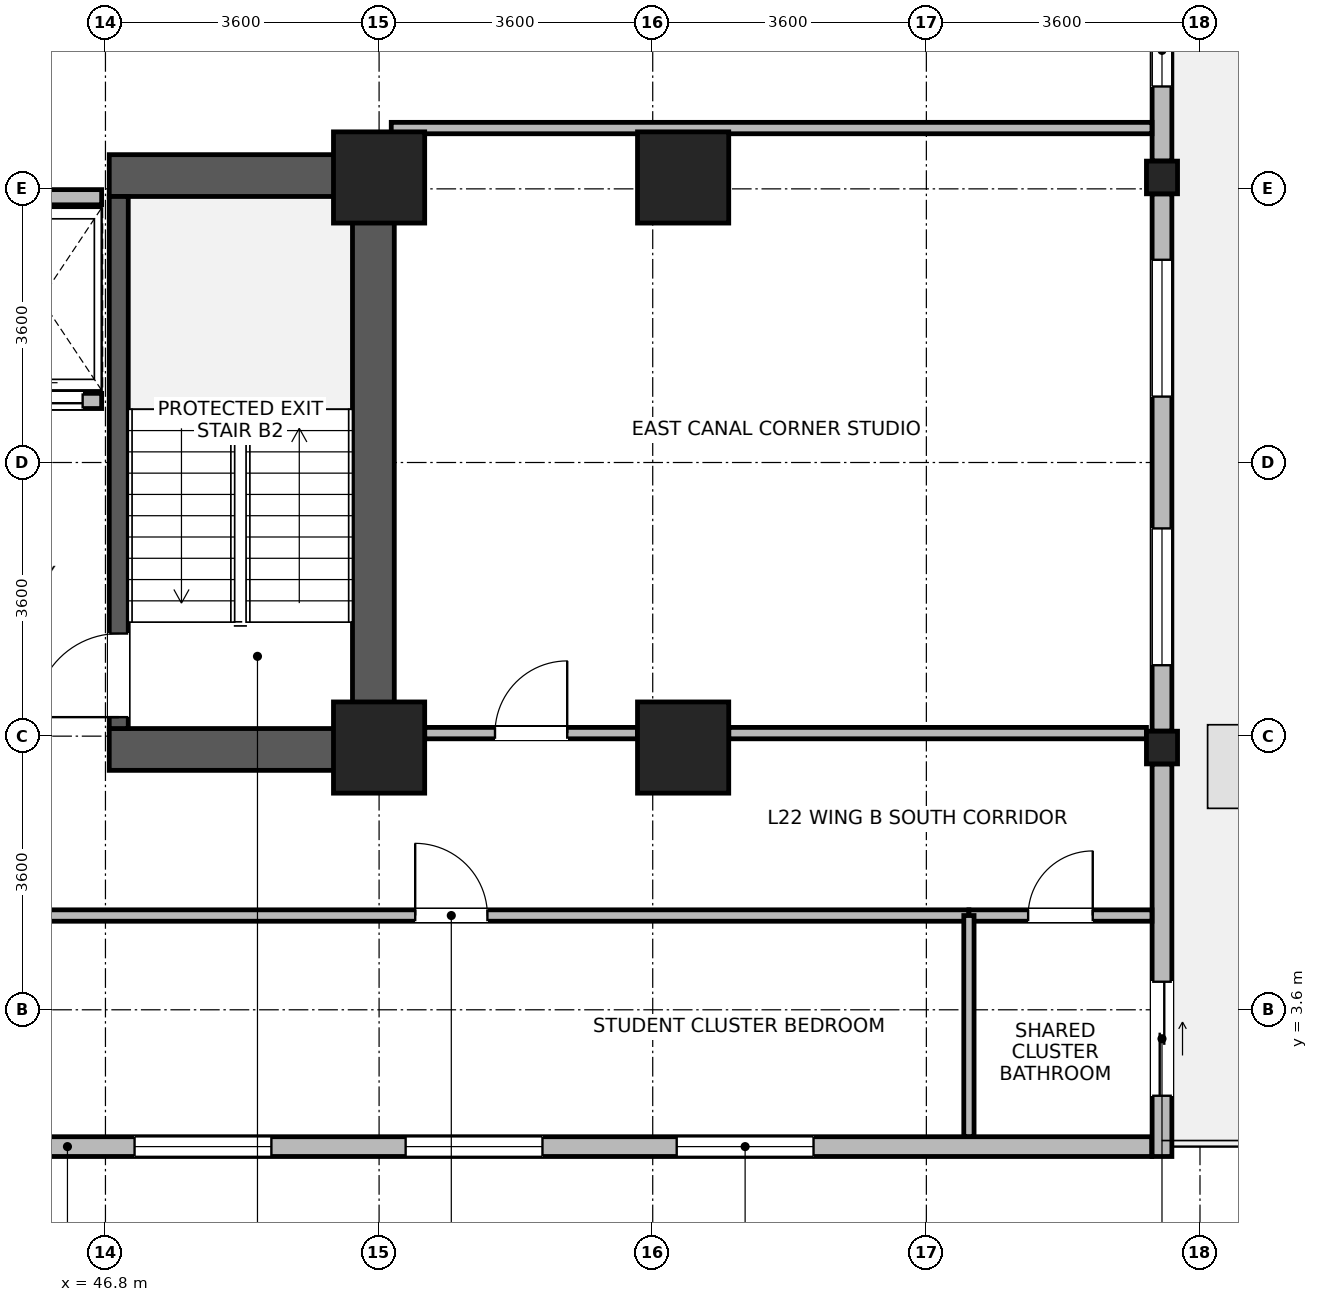
"""IFC4 building model, lengths in metres.
Left out: names, types, materials, properties, quantities, classifications, styles, units other than length and angle.
Written with IfcOpenShell. Run it as: python <this file> out.ifc"""

import sys

from ifc_helpers import new_model, si_unit, direction, frame, frame_2d, origin, origin_2d, place, context, subcontext, project, spatial, rectangle, i_section, extrude, source, transform, mapped, element, fill, save


model = new_model("IFC4")
c1 = context("Model", 3, precision=1e-05, world=origin(), true_north=direction((0.0, 1.0)))
c2 = subcontext(c1, "Body", "Model", "MODEL_VIEW")
j1 = project(units=[si_unit("LENGTHUNIT", "METRE"), si_unit("PLANEANGLEUNIT", "RADIAN")], contexts=[c1])
p1 = place(None, origin())
s1 = spatial("IfcSite", under=j1, at=p1, CompositionType="ELEMENT")
p2 = place(p1, origin())
s2 = spatial("IfcBuilding", under=s1, at=p2, CompositionType="ELEMENT")
p3 = place(p2, frame((0.0, 0.0, 89.7)))
s3 = spatial("IfcBuildingStorey", under=s2, at=p3, CompositionType="ELEMENT", Elevation=89.7)
p4 = place(p3, frame((50.325, 6.75, 0.0), z_axis=(0.0, 0.0, 1.0), x_axis=(0.0, 1.0, 0.0)))
e1 = element("IfcWall", 1, at=p4, inside=s3, PredefinedType="SHEAR", context=c2, shape_type="SweptSolid", body=[
    extrude(rectangle(XDim=8.1, YDim=0.55, at=frame_2d((4.05, 0.0))), origin(), (0.0, 0.0, 1.0), 3.45),
])
for number, where, z_axis, x_axis in (
    (2, (46.85, 7.025, 0.0), (0.0, 0.0, 1.0), (1.0, 0.0, 0.0)),
    (3, (46.85, 14.575, 0.0), (0.0, 0.0, 1.0), (1.0, 0.0, 0.0)),
):
    element("IfcWall", number, at=place(p3, frame(where, z_axis=z_axis, x_axis=x_axis)), inside=s3, PredefinedType="SHEAR", context=c2, shape_type="SweptSolid", body=[
        extrude(rectangle(XDim=3.2, YDim=0.55, at=frame_2d((1.6, 0.0))), origin(), (0.0, 0.0, 1.0), 3.45),
    ])
p5 = place(p3, frame((46.975, 7.3, 0.0), z_axis=(0.0, 0.0, 1.0), x_axis=(0.0, 1.0, 0.0)))
e4 = element("IfcWall", 4, at=p5, inside=s3, PredefinedType="SHEAR", context=c2, shape_type="SweptSolid", body=[
    extrude(rectangle(XDim=7.0, YDim=0.25, at=frame_2d((3.5, 0.0))), origin(), (0.0, 0.0, 1.0), 3.45),
])
p6 = place(p5, frame((0.15, 0.0, 0.0)))
e5 = element("IfcOpeningElement", 5, at=p6, cuts=e4, PredefinedType="OPENING", context=c2, shape_type="SweptSolid", body=[
    extrude(rectangle(XDim=1.1, YDim=2.08, at=frame_2d((0.55, 1.04))), frame((0.0, 0.135, 0.0), z_axis=(0.0, -1.0, 0.0), x_axis=(1.0, 0.0, 0.0)), (0.0, 0.0, 1.0), 0.27),
])
m1 = source(origin(), c2, "Body", "SweptSolid", [
    extrude(rectangle(XDim=1.2, YDim=1.2, at=origin_2d()), origin(), (0.0, 0.0, 1.0), 3.7),
])
for number, where, z_axis, x_axis in (
    (6, (50.4, 7.05, 0.0), (0.0, 0.0, 1.0), (1.0, 0.0, 0.0)),
    (7, (50.4, 14.55, 0.0), (0.0, 0.0, 1.0), (1.0, 0.0, 0.0)),
    (8, (54.4, 7.05, 0.0), (0.0, 0.0, 1.0), (1.0, 0.0, 0.0)),
    (9, (54.4, 14.55, 0.0), (0.0, 0.0, 1.0), (1.0, 0.0, 0.0)),
):
    element("IfcColumn", number, at=place(p3, frame(where, z_axis=z_axis, x_axis=x_axis)), inside=s3, PredefinedType="COLUMN", context=c2, shape_type="MappedRepresentation", body=[
        mapped(m1, transform((0.0, 0.0, 0.0), x_axis=(1.0, 0.0, 0.0), y_axis=(0.0, 1.0, 0.0), z_axis=(0.0, 0.0, 1.0), scale=1.0)),
    ])
m2 = source(origin(), c2, "Body", "SweptSolid", [
    extrude(i_section(OverallWidth=0.409, OverallDepth=0.43, WebThickness=0.024, FlangeThickness=0.033, FilletRadius=0.015, at=origin_2d()), origin(), (0.0, 0.0, 1.0), 3.7),
])
for number, where, z_axis, x_axis in (
    (10, (60.7, 7.05, 0.0), (0.0, 0.0, 1.0), (1.0, 0.0, 0.0)),
    (11, (60.7, 14.55, 0.0), (0.0, 0.0, 1.0), (1.0, 0.0, 0.0)),
):
    element("IfcColumn", number, at=place(p3, frame(where, z_axis=z_axis, x_axis=x_axis)), inside=s3, PredefinedType="COLUMN", context=c2, shape_type="MappedRepresentation", body=[
        mapped(m2, transform((0.0, 0.0, 0.0), x_axis=(1.0, 0.0, 0.0), y_axis=(0.0, 1.0, 0.0), z_axis=(0.0, 0.0, 1.0), scale=1.0)),
    ])
p7 = place(p3, frame((60.565, 1.8, 0.0), z_axis=(0.0, 0.0, 1.0), x_axis=(-1.0, 0.0, 0.0)))
e12 = element("IfcWall", 12, at=p7, inside=s3, PredefinedType="STANDARD", context=c2, shape_type="SweptSolid", body=[
    extrude(rectangle(XDim=28.53, YDim=0.26, at=frame_2d((14.265, 0.0))), origin(), (0.0, 0.0, 1.0), 3.43),
])
p8 = place(p7, frame((4.449, 0.0, 0.85)))
e13 = element("IfcOpeningElement", 13, at=p8, cuts=e12, PredefinedType="OPENING", context=c2, shape_type="SweptSolid", body=[
    extrude(rectangle(XDim=1.8, YDim=1.85, at=frame_2d((0.9, 0.925))), frame((0.0, 0.14, 0.0), z_axis=(0.0, -1.0, 0.0), x_axis=(1.0, 0.0, 0.0)), (0.0, 0.0, 1.0), 0.28),
])
p9 = place(p7, frame((8.016, 0.0, 0.85)))
e14 = element("IfcOpeningElement", 14, at=p9, cuts=e12, PredefinedType="OPENING", context=c2, shape_type="SweptSolid", body=[
    extrude(rectangle(XDim=1.8, YDim=1.85, at=frame_2d((0.9, 0.925))), frame((0.0, 0.14, 0.0), z_axis=(0.0, -1.0, 0.0), x_axis=(1.0, 0.0, 0.0)), (0.0, 0.0, 1.0), 0.28),
])
p10 = place(p7, frame((11.582, 0.0, 0.85)))
e15 = element("IfcOpeningElement", 15, at=p10, cuts=e12, PredefinedType="OPENING", context=c2, shape_type="SweptSolid", body=[
    extrude(rectangle(XDim=1.8, YDim=1.85, at=frame_2d((0.9, 0.925))), frame((0.0, 0.14, 0.0), z_axis=(0.0, -1.0, 0.0), x_axis=(1.0, 0.0, 0.0)), (0.0, 0.0, 1.0), 0.28),
])
p11 = place(p7, frame((18.714, 0.0, 0.85)))
e16 = element("IfcOpeningElement", 16, at=p11, cuts=e12, PredefinedType="OPENING", context=c2, shape_type="SweptSolid", body=[
    extrude(rectangle(XDim=1.8, YDim=1.85, at=frame_2d((0.9, 0.925))), frame((0.0, 0.14, 0.0), z_axis=(0.0, -1.0, 0.0), x_axis=(1.0, 0.0, 0.0)), (0.0, 0.0, 1.0), 0.28),
])
p12 = place(p7, frame((22.281, 0.0, 0.85)))
e17 = element("IfcOpeningElement", 17, at=p12, cuts=e12, PredefinedType="OPENING", context=c2, shape_type="SweptSolid", body=[
    extrude(rectangle(XDim=1.8, YDim=1.85, at=frame_2d((0.9, 0.925))), frame((0.0, 0.14, 0.0), z_axis=(0.0, -1.0, 0.0), x_axis=(1.0, 0.0, 0.0)), (0.0, 0.0, 1.0), 0.28),
])
p13 = place(p7, frame((25.847, 0.0, 0.85)))
e18 = element("IfcOpeningElement", 18, at=p13, cuts=e12, PredefinedType="OPENING", context=c2, shape_type="SweptSolid", body=[
    extrude(rectangle(XDim=1.8, YDim=1.85, at=frame_2d((0.9, 0.925))), frame((0.0, 0.14, 0.0), z_axis=(0.0, -1.0, 0.0), x_axis=(1.0, 0.0, 0.0)), (0.0, 0.0, 1.0), 0.28),
])
p14 = place(p3, frame((60.7, 6.834, 0.0), z_axis=(0.0, 0.0, 1.0), x_axis=(0.0, -1.0, 0.0)))
e19 = element("IfcWall", 19, at=p14, inside=s3, PredefinedType="STANDARD", context=c2, shape_type="SweptSolid", body=[
    extrude(rectangle(XDim=5.164, YDim=0.26, at=frame_2d((2.582, 0.0))), origin(), (0.0, 0.0, 1.0), 3.43),
])
p15 = place(p14, frame((2.865, 0.0, 0.0)))
e20 = element("IfcOpeningElement", 20, at=p15, cuts=e19, PredefinedType="OPENING", context=c2, shape_type="SweptSolid", body=[
    extrude(rectangle(XDim=1.5, YDim=2.15, at=frame_2d((0.75, 1.075))), frame((0.0, 0.14, 0.0), z_axis=(0.0, -1.0, 0.0), x_axis=(1.0, 0.0, 0.0)), (0.0, 0.0, 1.0), 0.28),
])
p16 = place(p3, frame((60.7, 14.334, 0.0), z_axis=(0.0, 0.0, 1.0), x_axis=(0.0, -1.0, 0.0)))
e21 = element("IfcWall", 21, at=p16, inside=s3, PredefinedType="STANDARD", context=c2, shape_type="SweptSolid", body=[
    extrude(rectangle(XDim=7.068, YDim=0.26, at=frame_2d((3.534, 0.0))), origin(), (0.0, 0.0, 1.0), 2.93),
])
p17 = place(p16, frame((0.867, 0.0, 0.85)))
e22 = element("IfcOpeningElement", 22, at=p17, cuts=e21, PredefinedType="OPENING", context=c2, shape_type="SweptSolid", body=[
    extrude(rectangle(XDim=1.8, YDim=1.85, at=frame_2d((0.9, 0.925))), frame((0.0, 0.14, 0.0), z_axis=(0.0, -1.0, 0.0), x_axis=(1.0, 0.0, 0.0)), (0.0, 0.0, 1.0), 0.28),
])
p18 = place(p16, frame((4.401, 0.0, 0.85)))
e23 = element("IfcOpeningElement", 23, at=p18, cuts=e21, PredefinedType="OPENING", context=c2, shape_type="SweptSolid", body=[
    extrude(rectangle(XDim=1.8, YDim=1.85, at=frame_2d((0.9, 0.925))), frame((0.0, 0.14, 0.0), z_axis=(0.0, -1.0, 0.0), x_axis=(1.0, 0.0, 0.0)), (0.0, 0.0, 1.0), 0.28),
])
p19 = place(p3, frame((60.7, 21.384, 0.0), z_axis=(0.0, 0.0, 1.0), x_axis=(0.0, -1.0, 0.0)))
e24 = element("IfcWall", 24, at=p19, inside=s3, PredefinedType="STANDARD", context=c2, shape_type="SweptSolid", body=[
    extrude(rectangle(XDim=6.618, YDim=0.26, at=frame_2d((3.309, 0.0))), origin(), (0.0, 0.0, 1.0), 2.93),
])
p20 = place(p19, frame((0.754, 0.0, 0.85)))
e25 = element("IfcOpeningElement", 25, at=p20, cuts=e24, PredefinedType="OPENING", context=c2, shape_type="SweptSolid", body=[
    extrude(rectangle(XDim=1.8, YDim=1.85, at=frame_2d((0.9, 0.925))), frame((0.0, 0.14, 0.0), z_axis=(0.0, -1.0, 0.0), x_axis=(1.0, 0.0, 0.0)), (0.0, 0.0, 1.0), 0.28),
])
p21 = place(p19, frame((4.687, 0.0, 0.85)))
e26 = element("IfcOpeningElement", 26, at=p21, cuts=e24, PredefinedType="OPENING", context=c2, shape_type="SweptSolid", body=[
    extrude(rectangle(XDim=0.95, YDim=1.75, at=frame_2d((0.475, 0.875))), frame((0.0, 0.14, 0.0), z_axis=(0.0, -1.0, 0.0), x_axis=(1.0, 0.0, 0.0)), (0.0, 0.0, 1.0), 0.28),
])
p22 = place(p3, frame((45.15, 11.61, 0.0), z_axis=(0.0, 0.0, 1.0), x_axis=(1.0, 0.0, 0.0)))
e27 = element("IfcWall", 27, at=p22, inside=s3, PredefinedType="PARTITIONING", context=c2, shape_type="SweptSolid", body=[
    extrude(rectangle(XDim=1.6, YDim=0.2, at=frame_2d((0.8, 0.0))), origin(), (0.0, 0.0, 1.0), 3.43),
])
p23 = place(p22, frame((0.25, 0.0, 0.0)))
e28 = element("IfcOpeningElement", 28, at=p23, cuts=e27, PredefinedType="OPENING", context=c2, shape_type="SweptSolid", body=[
    extrude(rectangle(XDim=1.1, YDim=2.12, at=frame_2d((0.55, 1.06))), frame((0.0, 0.11, 0.0), z_axis=(0.0, -1.0, 0.0), x_axis=(1.0, 0.0, 0.0)), (0.0, 0.0, 1.0), 0.22),
])
p24 = place(p3, frame((45.15, 14.29, 0.0), z_axis=(0.0, 0.0, 1.0), x_axis=(1.0, 0.0, 0.0)))
e29 = element("IfcWall", 29, at=p24, inside=s3, PredefinedType="PARTITIONING", context=c2, shape_type="SweptSolid", body=[
    extrude(rectangle(XDim=1.6, YDim=0.2, at=frame_2d((0.8, 0.0))), origin(), (0.0, 0.0, 1.0), 2.23),
])
p25 = place(p3, frame((44.54, 4.84, 0.0), z_axis=(0.0, 0.0, 1.0), x_axis=(1.0, 0.0, 0.0)))
e30 = element("IfcWall", 30, at=p25, inside=s3, PredefinedType="PARTITIONING", context=c2, shape_type="SweptSolid", body=[
    extrude(rectangle(XDim=13.62, YDim=0.15, at=frame_2d((6.81, 0.0))), origin(), (0.0, 0.0, 1.0), 3.43),
])
p26 = place(p25, frame((6.335, 0.0, 0.0)))
e31 = element("IfcOpeningElement", 31, at=p26, cuts=e30, PredefinedType="OPENING", context=c2, shape_type="SweptSolid", body=[
    extrude(rectangle(XDim=0.95, YDim=2.1, at=frame_2d((0.475, 1.05))), frame((0.0, 0.085, 0.0), z_axis=(0.0, -1.0, 0.0), x_axis=(1.0, 0.0, 0.0)), (0.0, 0.0, 1.0), 0.17),
])
p27 = place(p3, frame((51.0, 7.24, 0.0), z_axis=(0.0, 0.0, 1.0), x_axis=(1.0, 0.0, 0.0)))
e32 = element("IfcWall", 32, at=p27, inside=s3, PredefinedType="PARTITIONING", context=c2, shape_type="SweptSolid", body=[
    extrude(rectangle(XDim=2.8, YDim=0.15, at=frame_2d((1.4, 0.0))), origin(), (0.0, 0.0, 1.0), 2.78),
])
p28 = place(p27, frame((0.925, 0.0, 0.0)))
e33 = element("IfcOpeningElement", 33, at=p28, cuts=e32, PredefinedType="OPENING", context=c2, shape_type="SweptSolid", body=[
    extrude(rectangle(XDim=0.95, YDim=2.1, at=frame_2d((0.475, 1.05))), frame((0.0, 0.085, 0.0), z_axis=(0.0, -1.0, 0.0), x_axis=(1.0, 0.0, 0.0)), (0.0, 0.0, 1.0), 0.17),
])
p29 = place(p3, frame((55.0, 7.24, 0.0), z_axis=(0.0, 0.0, 1.0), x_axis=(1.0, 0.0, 0.0)))
e34 = element("IfcWall", 34, at=p29, inside=s3, PredefinedType="PARTITIONING", context=c2, shape_type="SweptSolid", body=[
    extrude(rectangle(XDim=5.496, YDim=0.15, at=frame_2d((2.748, 0.0))), origin(), (0.0, 0.0, 1.0), 2.78),
])
p30 = place(p3, frame((50.56, 15.2, 0.0), z_axis=(0.0, 0.0, 1.0), x_axis=(1.0, 0.0, 0.0)))
e35 = element("IfcWall", 35, at=p30, inside=s3, PredefinedType="PARTITIONING", context=c2, shape_type="SweptSolid", body=[
    extrude(rectangle(XDim=10.008, YDim=0.15, at=frame_2d((5.004, 0.0))), origin(), (0.0, 0.0, 1.0), 3.43),
])
p31 = place(p3, frame((58.16, 4.84, 0.0), z_axis=(0.0, 0.0, 1.0), x_axis=(1.0, 0.0, 0.0)))
e36 = element("IfcWall", 36, at=p31, inside=s3, PredefinedType="PARTITIONING", context=c2, shape_type="SweptSolid", body=[
    extrude(rectangle(XDim=2.408, YDim=0.15, at=frame_2d((1.204, 0.0))), origin(), (0.0, 0.0, 1.0), 3.43),
])
p32 = place(p31, frame((0.779, 0.0, 0.0)))
e37 = element("IfcOpeningElement", 37, at=p32, cuts=e36, PredefinedType="OPENING", context=c2, shape_type="SweptSolid", body=[
    extrude(rectangle(XDim=0.85, YDim=2.04, at=frame_2d((0.425, 1.02))), frame((0.0, 0.085, 0.0), z_axis=(0.0, -1.0, 0.0), x_axis=(1.0, 0.0, 0.0)), (0.0, 0.0, 1.0), 0.17),
])
p33 = place(p3, frame((58.16, 1.932, 0.0), z_axis=(0.0, 0.0, 1.0), x_axis=(0.0, 1.0, 0.0)))
e38 = element("IfcWall", 38, at=p33, inside=s3, PredefinedType="PARTITIONING", context=c2, shape_type="SweptSolid", body=[
    extrude(rectangle(XDim=2.908, YDim=0.135, at=frame_2d((1.454, 0.0))), origin(), (0.0, 0.0, 1.0), 3.43),
])
p34 = place(p8, origin())
e39 = element("IfcWindow", 39, at=p34, inside=s3, PartitioningType="SINGLE_PANEL", PredefinedType="WINDOW", context=c2, shape_type="SweptSolid", body=[
    extrude(rectangle(XDim=1.8, YDim=1.85, at=frame_2d((0.9, 0.925))), frame((0.0, 0.03, 0.0), z_axis=(0.0, -1.0, 0.0), x_axis=(1.0, 0.0, 0.0)), (0.0, 0.0, 1.0), 0.06),
])
fill(e13, e39)
p35 = place(p9, origin())
e40 = element("IfcWindow", 40, at=p35, inside=s3, PartitioningType="SINGLE_PANEL", PredefinedType="WINDOW", context=c2, shape_type="SweptSolid", body=[
    extrude(rectangle(XDim=1.8, YDim=1.85, at=frame_2d((0.9, 0.925))), frame((0.0, 0.03, 0.0), z_axis=(0.0, -1.0, 0.0), x_axis=(1.0, 0.0, 0.0)), (0.0, 0.0, 1.0), 0.06),
])
fill(e14, e40)
p36 = place(p10, origin())
e41 = element("IfcWindow", 41, at=p36, inside=s3, PartitioningType="SINGLE_PANEL", PredefinedType="WINDOW", context=c2, shape_type="SweptSolid", body=[
    extrude(rectangle(XDim=1.8, YDim=1.85, at=frame_2d((0.9, 0.925))), frame((0.0, 0.03, 0.0), z_axis=(0.0, -1.0, 0.0), x_axis=(1.0, 0.0, 0.0)), (0.0, 0.0, 1.0), 0.06),
])
fill(e15, e41)
p37 = place(p15, origin())
e42 = element("IfcDoor", 42, at=p37, inside=s3, OperationType="SLIDING_TO_LEFT", PredefinedType="DOOR", context=c2, shape_type="SweptSolid", body=[
    extrude(rectangle(XDim=1.5, YDim=2.15, at=frame_2d((0.75, 1.075))), frame((0.0, 0.025, 0.0), z_axis=(0.0, -1.0, 0.0), x_axis=(1.0, 0.0, 0.0)), (0.0, 0.0, 1.0), 0.05),
])
fill(e20, e42)
p38 = place(p17, origin())
e43 = element("IfcWindow", 43, at=p38, inside=s3, PartitioningType="SINGLE_PANEL", PredefinedType="WINDOW", context=c2, shape_type="SweptSolid", body=[
    extrude(rectangle(XDim=1.8, YDim=1.85, at=frame_2d((0.9, 0.925))), frame((0.0, 0.03, 0.0), z_axis=(0.0, -1.0, 0.0), x_axis=(1.0, 0.0, 0.0)), (0.0, 0.0, 1.0), 0.06),
])
fill(e22, e43)
p39 = place(p18, origin())
e44 = element("IfcWindow", 44, at=p39, inside=s3, PartitioningType="SINGLE_PANEL", PredefinedType="WINDOW", context=c2, shape_type="SweptSolid", body=[
    extrude(rectangle(XDim=1.8, YDim=1.85, at=frame_2d((0.9, 0.925))), frame((0.0, 0.03, 0.0), z_axis=(0.0, -1.0, 0.0), x_axis=(1.0, 0.0, 0.0)), (0.0, 0.0, 1.0), 0.06),
])
fill(e23, e44)
p40 = place(p21, origin())
e45 = element("IfcWindow", 45, at=p40, inside=s3, PartitioningType="SINGLE_PANEL", PredefinedType="WINDOW", context=c2, shape_type="SweptSolid", body=[
    extrude(rectangle(XDim=0.95, YDim=1.75, at=frame_2d((0.475, 0.875))), frame((0.0, 0.03, 0.0), z_axis=(0.0, -1.0, 0.0), x_axis=(1.0, 0.0, 0.0)), (0.0, 0.0, 1.0), 0.06),
])
fill(e26, e45)
p41 = place(p6, origin())
e46 = element("IfcDoor", 46, at=p41, inside=s3, OperationType="SINGLE_SWING_LEFT", PredefinedType="DOOR", context=c2, shape_type="SweptSolid", body=[
    extrude(rectangle(XDim=1.1, YDim=2.08, at=frame_2d((0.55, 1.04))), frame((0.0, 0.025, 0.0), z_axis=(0.0, -1.0, 0.0), x_axis=(1.0, 0.0, 0.0)), (0.0, 0.0, 1.0), 0.05),
])
fill(e5, e46)
p42 = place(p23, origin())
e47 = element("IfcDoor", 47, at=p42, inside=s3, OperationType="SLIDING_TO_LEFT", PredefinedType="DOOR", context=c2, shape_type="SweptSolid", body=[
    extrude(rectangle(XDim=1.1, YDim=2.12, at=frame_2d((0.55, 1.06))), frame((0.0, 0.025, 0.0), z_axis=(0.0, -1.0, 0.0), x_axis=(1.0, 0.0, 0.0)), (0.0, 0.0, 1.0), 0.05),
])
fill(e28, e47)
p43 = place(p26, origin())
e48 = element("IfcDoor", 48, at=p43, inside=s3, OperationType="SINGLE_SWING_LEFT", PredefinedType="DOOR", context=c2, shape_type="SweptSolid", body=[
    extrude(rectangle(XDim=0.95, YDim=2.1, at=frame_2d((0.475, 1.05))), frame((0.0, 0.025, 0.0), z_axis=(0.0, -1.0, 0.0), x_axis=(1.0, 0.0, 0.0)), (0.0, 0.0, 1.0), 0.05),
])
fill(e31, e48)
p44 = place(p28, origin())
e49 = element("IfcDoor", 49, at=p44, inside=s3, OperationType="SINGLE_SWING_RIGHT", PredefinedType="DOOR", context=c2, shape_type="SweptSolid", body=[
    extrude(rectangle(XDim=0.95, YDim=2.1, at=frame_2d((0.475, 1.05))), frame((0.0, 0.025, 0.0), z_axis=(0.0, -1.0, 0.0), x_axis=(1.0, 0.0, 0.0)), (0.0, 0.0, 1.0), 0.05),
])
fill(e33, e49)
p45 = place(p32, origin())
e50 = element("IfcDoor", 50, at=p45, inside=s3, OperationType="SINGLE_SWING_RIGHT", PredefinedType="DOOR", context=c2, shape_type="SweptSolid", body=[
    extrude(rectangle(XDim=0.85, YDim=2.04, at=frame_2d((0.425, 1.02))), frame((0.0, 0.025, 0.0), z_axis=(0.0, -1.0, 0.0), x_axis=(1.0, 0.0, 0.0)), (0.0, 0.0, 1.0), 0.05),
])
fill(e37, e50)
save(model, sys.argv[1])
